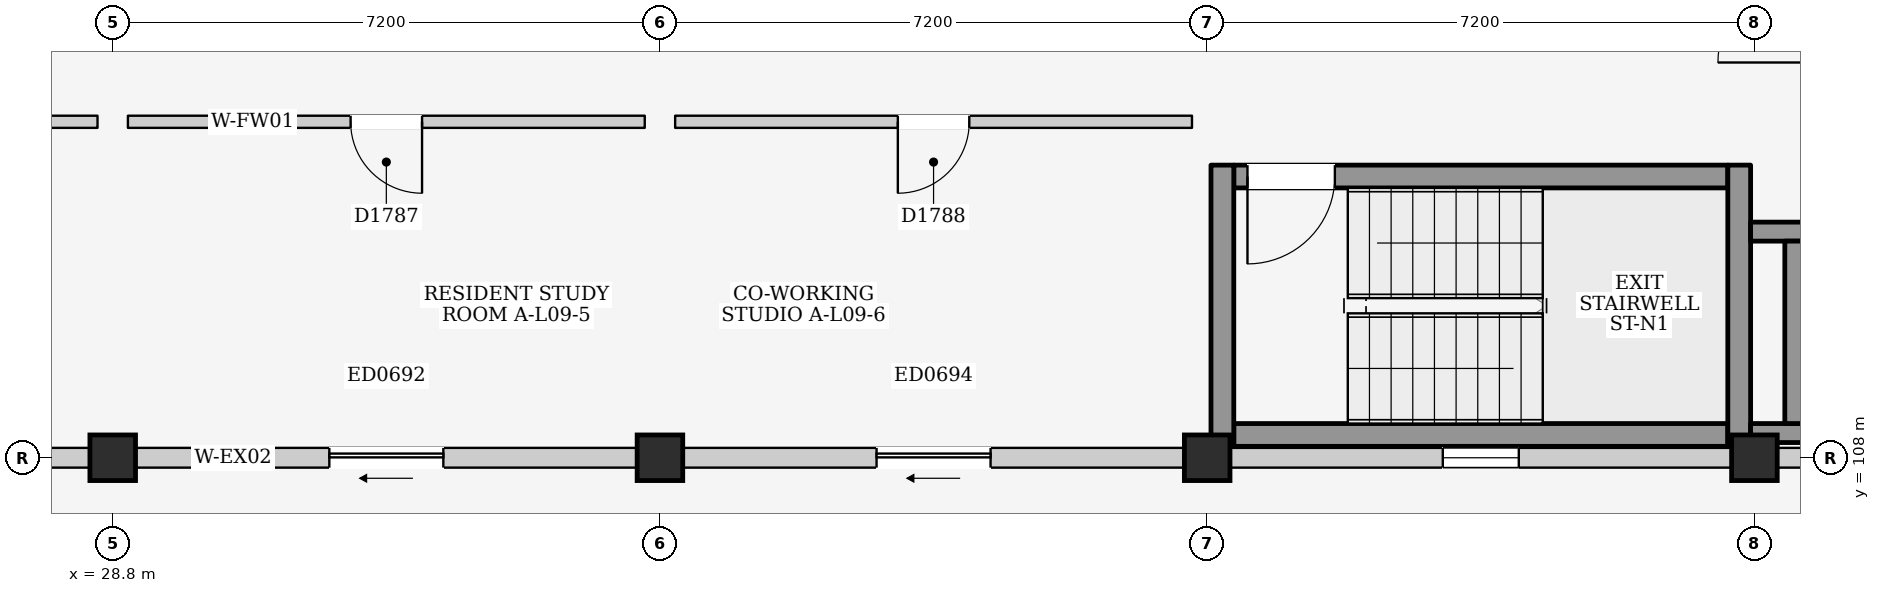
"""IFC4 building model, lengths in metres.
Left out: names, types, materials, properties, quantities, classifications, styles, units other than length and angle.
Written with IfcOpenShell. Run it as: python <this file> out.ifc"""

import sys

from ifc_helpers import new_model, si_unit, direction, frame, frame_2d, origin, origin_2d, place, context, subcontext, project, spatial, rectangle, extrude, element, fill, save


model = new_model("IFC4")
c1 = context("Model", 3, precision=1e-05, world=origin(), true_north=direction((0.0, 1.0)))
c2 = subcontext(c1, "Body", "Model", "MODEL_VIEW")
j1 = project(units=[si_unit("LENGTHUNIT", "METRE"), si_unit("PLANEANGLEUNIT", "RADIAN")], contexts=[c1])
p1 = place(None, origin())
s1 = spatial("IfcSite", under=j1, at=p1, CompositionType="ELEMENT")
p2 = place(p1, origin())
s2 = spatial("IfcBuilding", under=s1, at=p2, CompositionType="ELEMENT")
p3 = place(p2, frame((0.0, 0.0, 31.5)))
s3 = spatial("IfcBuildingStorey", under=s2, at=p3, CompositionType="ELEMENT", Elevation=31.5)
for number, where, z_axis, x_axis in (
    (1, (28.8, 108.0, 0.0), (0.0, 0.0, 1.0), (1.0, 0.0, 0.0)),
    (2, (36.0, 108.0, 0.0), (0.0, 0.0, 1.0), (1.0, 0.0, 0.0)),
    (3, (43.2, 108.0, 0.0), (0.0, 0.0, 1.0), (1.0, 0.0, 0.0)),
    (4, (50.4, 108.0, 0.0), (0.0, 0.0, 1.0), (1.0, 0.0, 0.0)),
):
    element("IfcColumn", number, at=place(p3, frame(where, z_axis=z_axis, x_axis=x_axis)), inside=s3, PredefinedType="COLUMN", context=c2, shape_type="SweptSolid", body=[
        extrude(rectangle(XDim=0.6, YDim=0.6, at=origin_2d()), origin(), (0.0, 0.0, 1.0), 3.3),
    ])
p4 = place(p3, frame((21.9, 108.0, 0.0), z_axis=(0.0, 0.0, 1.0), x_axis=(1.0, 0.0, 0.0)))
e5 = element("IfcWall", 5, at=p4, inside=s3, PredefinedType="ELEMENTEDWALL", context=c2, shape_type="SweptSolid", body=[
    extrude(rectangle(XDim=6.6, YDim=0.26, at=frame_2d((3.3, 0.0))), origin(), (0.0, 0.0, 1.0), 2.415),
])
p5 = place(p4, frame((2.55, 0.0, 0.0)))
e6 = element("IfcOpeningElement", 6, at=p5, cuts=e5, PredefinedType="OPENING", context=c2, shape_type="SweptSolid", body=[
    extrude(rectangle(XDim=1.5, YDim=2.12, at=frame_2d((0.75, 1.06))), frame((0.0, 0.145, 0.0), z_axis=(0.0, -1.0, 0.0), x_axis=(1.0, 0.0, 0.0)), (0.0, 0.0, 1.0), 0.29),
])
p6 = place(p3, frame((29.1, 108.0, 0.0), z_axis=(0.0, 0.0, 1.0), x_axis=(1.0, 0.0, 0.0)))
e7 = element("IfcWall", 7, at=p6, inside=s3, PredefinedType="ELEMENTEDWALL", context=c2, shape_type="SweptSolid", body=[
    extrude(rectangle(XDim=6.6, YDim=0.26, at=frame_2d((3.3, 0.0))), origin(), (0.0, 0.0, 1.0), 2.415),
])
p7 = place(p6, frame((2.55, 0.0, 0.0)))
e8 = element("IfcOpeningElement", 8, at=p7, cuts=e7, PredefinedType="OPENING", context=c2, shape_type="SweptSolid", body=[
    extrude(rectangle(XDim=1.5, YDim=2.12, at=frame_2d((0.75, 1.06))), frame((0.0, 0.145, 0.0), z_axis=(0.0, -1.0, 0.0), x_axis=(1.0, 0.0, 0.0)), (0.0, 0.0, 1.0), 0.29),
])
p8 = place(p3, frame((36.3, 108.0, 0.0), z_axis=(0.0, 0.0, 1.0), x_axis=(1.0, 0.0, 0.0)))
e9 = element("IfcWall", 9, at=p8, inside=s3, PredefinedType="ELEMENTEDWALL", context=c2, shape_type="SweptSolid", body=[
    extrude(rectangle(XDim=6.6, YDim=0.26, at=frame_2d((3.3, 0.0))), origin(), (0.0, 0.0, 1.0), 2.415),
])
p9 = place(p8, frame((2.55, 0.0, 0.0)))
e10 = element("IfcOpeningElement", 10, at=p9, cuts=e9, PredefinedType="OPENING", context=c2, shape_type="SweptSolid", body=[
    extrude(rectangle(XDim=1.5, YDim=2.12, at=frame_2d((0.75, 1.06))), frame((0.0, 0.145, 0.0), z_axis=(0.0, -1.0, 0.0), x_axis=(1.0, 0.0, 0.0)), (0.0, 0.0, 1.0), 0.29),
])
p10 = place(p3, frame((43.5, 108.0, 0.0), z_axis=(0.0, 0.0, 1.0), x_axis=(1.0, 0.0, 0.0)))
e11 = element("IfcWall", 11, at=p10, inside=s3, PredefinedType="ELEMENTEDWALL", context=c2, shape_type="SweptSolid", body=[
    extrude(rectangle(XDim=6.6, YDim=0.26, at=frame_2d((3.3, 0.0))), origin(), (0.0, 0.0, 1.0), 2.415),
])
p11 = place(p10, frame((2.8, 0.0, 1.2)))
e12 = element("IfcOpeningElement", 12, at=p11, cuts=e11, PredefinedType="OPENING", context=c2, shape_type="SweptSolid", body=[
    extrude(rectangle(XDim=1.0, YDim=0.9, at=frame_2d((0.5, 0.45))), frame((0.0, 0.145, 0.0), z_axis=(0.0, -1.0, 0.0), x_axis=(1.0, 0.0, 0.0)), (0.0, 0.0, 1.0), 0.29),
])
p12 = place(p3, frame((50.7, 108.0, 0.0), z_axis=(0.0, 0.0, 1.0), x_axis=(1.0, 0.0, 0.0)))
e13 = element("IfcWall", 13, at=p12, inside=s3, PredefinedType="ELEMENTEDWALL", context=c2, shape_type="SweptSolid", body=[
    extrude(rectangle(XDim=6.6, YDim=0.26, at=frame_2d((3.3, 0.0))), origin(), (0.0, 0.0, 1.0), 2.415),
])
p13 = place(p12, frame((2.8, 0.0, 1.2)))
e14 = element("IfcOpeningElement", 14, at=p13, cuts=e13, PredefinedType="OPENING", context=c2, shape_type="SweptSolid", body=[
    extrude(rectangle(XDim=1.0, YDim=0.9, at=frame_2d((0.5, 0.45))), frame((0.0, 0.145, 0.0), z_axis=(0.0, -1.0, 0.0), x_axis=(1.0, 0.0, 0.0)), (0.0, 0.0, 1.0), 0.29),
])
p14 = place(p3, frame((43.55, 108.3, 0.0), z_axis=(0.0, 0.0, 1.0), x_axis=(1.0, 0.0, 0.0)))
e15 = element("IfcWall", 15, at=p14, inside=s3, PredefinedType="SHEAR", context=c2, shape_type="SweptSolid", body=[
    extrude(rectangle(XDim=6.5, YDim=0.3, at=frame_2d((3.25, 0.0))), origin(), (0.0, 0.0, 1.0), 3.08),
])
p15 = place(p3, frame((43.55, 111.7, 0.0), z_axis=(0.0, 0.0, 1.0), x_axis=(1.0, 0.0, 0.0)))
e16 = element("IfcWall", 16, at=p15, inside=s3, PredefinedType="SHEAR", context=c2, shape_type="SweptSolid", body=[
    extrude(rectangle(XDim=6.5, YDim=0.3, at=frame_2d((3.25, 0.0))), origin(), (0.0, 0.0, 1.0), 3.08),
])
p16 = place(p15, frame((0.18, 0.0, 0.0)))
e17 = element("IfcOpeningElement", 17, at=p16, cuts=e16, PredefinedType="OPENING", context=c2, shape_type="SweptSolid", body=[
    extrude(rectangle(XDim=1.15, YDim=2.2, at=frame_2d((0.575, 1.1))), frame((0.0, 0.165, 0.0), z_axis=(0.0, -1.0, 0.0), x_axis=(1.0, 0.0, 0.0)), (0.0, 0.0, 1.0), 0.33),
])
for number, where, z_axis, x_axis in (
    (18, (43.4, 108.15, 0.0), (0.0, 0.0, 1.0), (0.0, 1.0, 0.0)),
    (19, (50.2, 108.15, 0.0), (0.0, 0.0, 1.0), (0.0, 1.0, 0.0)),
):
    element("IfcWall", number, at=place(p3, frame(where, z_axis=z_axis, x_axis=x_axis)), inside=s3, PredefinedType="SHEAR", context=c2, shape_type="SweptSolid", body=[
        extrude(rectangle(XDim=3.7, YDim=0.3, at=frame_2d((1.85, 0.0))), origin(), (0.0, 0.0, 1.0), 3.08),
    ])
p17 = place(p3, frame((50.35, 108.325, 0.0), z_axis=(0.0, 0.0, 1.0), x_axis=(1.0, 0.0, 0.0)))
e20 = element("IfcWall", 20, at=p17, inside=s3, PredefinedType="SHEAR", context=c2, shape_type="SweptSolid", body=[
    extrude(rectangle(XDim=2.675, YDim=0.25, at=frame_2d((1.337, 0.0))), origin(), (0.0, 0.0, 1.0), 3.08),
])
p18 = place(p3, frame((50.35, 110.975, 0.0), z_axis=(0.0, 0.0, 1.0), x_axis=(1.0, 0.0, 0.0)))
e21 = element("IfcWall", 21, at=p18, inside=s3, PredefinedType="SHEAR", context=c2, shape_type="SweptSolid", body=[
    extrude(rectangle(XDim=2.675, YDim=0.25, at=frame_2d((1.337, 0.0))), origin(), (0.0, 0.0, 1.0), 3.08),
])
p19 = place(p18, frame((1.0, 0.0, 0.0)))
e22 = element("IfcOpeningElement", 22, at=p19, cuts=e21, PredefinedType="OPENING", context=c2, shape_type="SweptSolid", body=[
    extrude(rectangle(XDim=1.2, YDim=2.25, at=frame_2d((0.6, 1.125))), frame((0.0, 0.14, 0.0), z_axis=(0.0, -1.0, 0.0), x_axis=(1.0, 0.0, 0.0)), (0.0, 0.0, 1.0), 0.28),
])
p20 = place(p3, frame((50.925, 108.45, 0.0), z_axis=(0.0, 0.0, 1.0), x_axis=(0.0, 1.0, 0.0)))
e23 = element("IfcWall", 23, at=p20, inside=s3, PredefinedType="SHEAR", context=c2, shape_type="SweptSolid", body=[
    extrude(rectangle(XDim=2.4, YDim=0.25, at=frame_2d((1.2, 0.0))), origin(), (0.0, 0.0, 1.0), 3.08),
])
p21 = place(p3, frame((21.8, 112.42, 0.0), z_axis=(0.0, 0.0, 1.0), x_axis=(1.0, 0.0, 0.0)))
e24 = element("IfcWall", 24, at=p21, inside=s3, PredefinedType="PARTITIONING", context=c2, shape_type="SweptSolid", body=[
    extrude(rectangle(XDim=6.8, YDim=0.16, at=frame_2d((3.4, 0.0))), origin(), (0.0, 0.0, 1.0), 3.08),
])
p22 = place(p21, frame((2.93, 0.0, 0.0)))
e25 = element("IfcOpeningElement", 25, at=p22, cuts=e24, PredefinedType="OPENING", context=c2, shape_type="SweptSolid", body=[
    extrude(rectangle(XDim=0.94, YDim=2.12, at=frame_2d((0.47, 1.06))), frame((0.0, 0.095, 0.0), z_axis=(0.0, -1.0, 0.0), x_axis=(1.0, 0.0, 0.0)), (0.0, 0.0, 1.0), 0.19),
])
p23 = place(p3, frame((29.0, 112.42, 0.0), z_axis=(0.0, 0.0, 1.0), x_axis=(1.0, 0.0, 0.0)))
e26 = element("IfcWall", 26, at=p23, inside=s3, PredefinedType="PARTITIONING", context=c2, shape_type="SweptSolid", body=[
    extrude(rectangle(XDim=6.8, YDim=0.16, at=frame_2d((3.4, 0.0))), origin(), (0.0, 0.0, 1.0), 3.08),
])
p24 = place(p23, frame((2.93, 0.0, 0.0)))
e27 = element("IfcOpeningElement", 27, at=p24, cuts=e26, PredefinedType="OPENING", context=c2, shape_type="SweptSolid", body=[
    extrude(rectangle(XDim=0.94, YDim=2.12, at=frame_2d((0.47, 1.06))), frame((0.0, 0.095, 0.0), z_axis=(0.0, -1.0, 0.0), x_axis=(1.0, 0.0, 0.0)), (0.0, 0.0, 1.0), 0.19),
])
p25 = place(p3, frame((36.2, 112.42, 0.0), z_axis=(0.0, 0.0, 1.0), x_axis=(1.0, 0.0, 0.0)))
e28 = element("IfcWall", 28, at=p25, inside=s3, PredefinedType="PARTITIONING", context=c2, shape_type="SweptSolid", body=[
    extrude(rectangle(XDim=6.8, YDim=0.16, at=frame_2d((3.4, 0.0))), origin(), (0.0, 0.0, 1.0), 3.08),
])
p26 = place(p25, frame((2.93, 0.0, 0.0)))
e29 = element("IfcOpeningElement", 29, at=p26, cuts=e28, PredefinedType="OPENING", context=c2, shape_type="SweptSolid", body=[
    extrude(rectangle(XDim=0.94, YDim=2.12, at=frame_2d((0.47, 1.06))), frame((0.0, 0.095, 0.0), z_axis=(0.0, -1.0, 0.0), x_axis=(1.0, 0.0, 0.0)), (0.0, 0.0, 1.0), 0.19),
])
p27 = place(p7, frame((1.5, 0.0, 0.0), z_axis=(0.0, 0.0, 1.0), x_axis=(-1.0, 0.0, 0.0)))
e30 = element("IfcDoor", 30, at=p27, inside=s3, OperationType="SLIDING_TO_LEFT", PredefinedType="DOOR", context=c2, shape_type="SweptSolid", body=[
    extrude(rectangle(XDim=1.5, YDim=2.12, at=frame_2d((0.75, 1.06))), frame((0.0, 0.025, 0.0), z_axis=(0.0, -1.0, 0.0), x_axis=(1.0, 0.0, 0.0)), (0.0, 0.0, 1.0), 0.05),
])
fill(e8, e30)
p28 = place(p9, frame((1.5, 0.0, 0.0), z_axis=(0.0, 0.0, 1.0), x_axis=(-1.0, 0.0, 0.0)))
e31 = element("IfcDoor", 31, at=p28, inside=s3, OperationType="SLIDING_TO_LEFT", PredefinedType="DOOR", context=c2, shape_type="SweptSolid", body=[
    extrude(rectangle(XDim=1.5, YDim=2.12, at=frame_2d((0.75, 1.06))), frame((0.0, 0.025, 0.0), z_axis=(0.0, -1.0, 0.0), x_axis=(1.0, 0.0, 0.0)), (0.0, 0.0, 1.0), 0.05),
])
fill(e10, e31)
p29 = place(p11, origin())
e32 = element("IfcWindow", 32, at=p29, inside=s3, PartitioningType="SINGLE_PANEL", PredefinedType="WINDOW", context=c2, shape_type="SweptSolid", body=[
    extrude(rectangle(XDim=1.0, YDim=0.9, at=frame_2d((0.5, 0.45))), frame((0.0, 0.03, 0.0), z_axis=(0.0, -1.0, 0.0), x_axis=(1.0, 0.0, 0.0)), (0.0, 0.0, 1.0), 0.06),
])
fill(e12, e32)
p30 = place(p16, frame((1.15, 0.0, 0.0), z_axis=(0.0, 0.0, 1.0), x_axis=(-1.0, 0.0, 0.0)))
e33 = element("IfcDoor", 33, at=p30, inside=s3, OperationType="SINGLE_SWING_RIGHT", PredefinedType="DOOR", context=c2, shape_type="SweptSolid", body=[
    extrude(rectangle(XDim=1.15, YDim=2.2, at=frame_2d((0.575, 1.1))), frame((0.0, 0.025, 0.0), z_axis=(0.0, -1.0, 0.0), x_axis=(1.0, 0.0, 0.0)), (0.0, 0.0, 1.0), 0.05),
])
fill(e17, e33)
p31 = place(p24, frame((0.94, 0.0, 0.0), z_axis=(0.0, 0.0, 1.0), x_axis=(-1.0, 0.0, 0.0)))
e34 = element("IfcDoor", 34, at=p31, inside=s3, OperationType="SINGLE_SWING_LEFT", PredefinedType="DOOR", context=c2, shape_type="SweptSolid", body=[
    extrude(rectangle(XDim=0.94, YDim=2.12, at=frame_2d((0.47, 1.06))), frame((0.0, 0.025, 0.0), z_axis=(0.0, -1.0, 0.0), x_axis=(1.0, 0.0, 0.0)), (0.0, 0.0, 1.0), 0.05),
])
fill(e27, e34)
p32 = place(p26, frame((0.94, 0.0, 0.0), z_axis=(0.0, 0.0, 1.0), x_axis=(-1.0, 0.0, 0.0)))
e35 = element("IfcDoor", 35, at=p32, inside=s3, OperationType="SINGLE_SWING_RIGHT", PredefinedType="DOOR", context=c2, shape_type="SweptSolid", body=[
    extrude(rectangle(XDim=0.94, YDim=2.12, at=frame_2d((0.47, 1.06))), frame((0.0, 0.025, 0.0), z_axis=(0.0, -1.0, 0.0), x_axis=(1.0, 0.0, 0.0)), (0.0, 0.0, 1.0), 0.05),
])
fill(e29, e35)
save(model, sys.argv[1])
